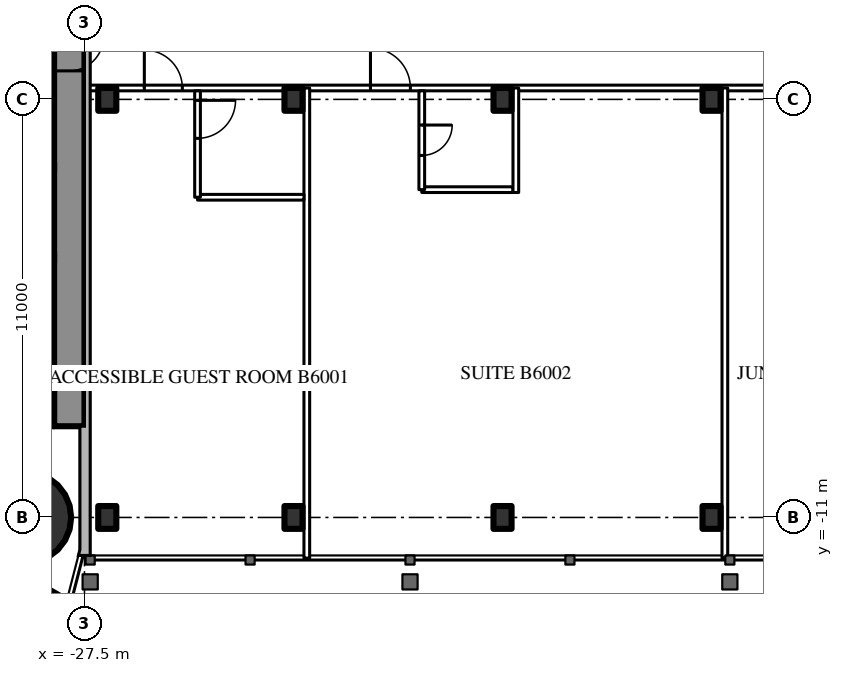
"""IFC4 building model, lengths in metres.
Left out: names, types, materials, properties, quantities, classifications, styles, units other than length and angle.
Written with IfcOpenShell. Run it as: python <this file> out.ifc"""

import sys

from ifc_helpers import new_model, si_unit, direction, frame, frame_2d, origin, origin_2d, place, context, subcontext, project, spatial, rectangle, circle, i_section, extrude, element, fill, save


model = new_model("IFC4")
c1 = context("Model", 3, precision=1e-05, world=origin(), true_north=direction((0.0, 1.0)))
c2 = subcontext(c1, "Body", "Model", "MODEL_VIEW")
j1 = project(units=[si_unit("LENGTHUNIT", "METRE"), si_unit("PLANEANGLEUNIT", "RADIAN")], contexts=[c1])
p1 = place(None, origin())
s1 = spatial("IfcSite", under=j1, at=p1, CompositionType="ELEMENT")
p2 = place(p1, origin())
s2 = spatial("IfcBuilding", under=s1, at=p2, CompositionType="ELEMENT")
p3 = place(p2, frame((0.0, 0.0, 226.1)))
s3 = spatial("IfcBuildingStorey", under=s2, at=p3, CompositionType="ELEMENT", Elevation=226.1)
p4 = place(p3, frame((-29.05, -11.0, 0.0), z_axis=(0.0, 0.0, 1.0), x_axis=(1.0, 0.0, 0.0)))
e1 = element("IfcColumn", 1, at=p4, inside=s3, PredefinedType="COLUMN", context=c2, shape_type="SweptSolid", body=[
    extrude(circle(Radius=1.2, at=origin_2d()), origin(), (0.0, 0.0, 1.0), 3.6),
])
p5 = place(p3, frame((-27.9, 8.6, 0.0), z_axis=(0.0, 0.0, 1.0), x_axis=(0.0, -1.0, 0.0)))
e2 = element("IfcWall", 2, at=p5, inside=s3, PredefinedType="SHEAR", context=c2, shape_type="SweptSolid", body=[
    extrude(rectangle(XDim=17.2, YDim=0.8, at=frame_2d((8.6, 0.0))), origin(), (0.0, 0.0, 1.0), 3.6),
])
p6 = place(p5, frame((6.95, 0.0, 0.0)))
e3 = element("IfcOpeningElement", 3, at=p6, cuts=e2, PredefinedType="OPENING", context=c2, shape_type="SweptSolid", body=[
    extrude(rectangle(XDim=0.9, YDim=2.2, at=frame_2d((0.45, 1.1))), frame((0.0, 0.41, 0.0), z_axis=(0.0, -1.0, 0.0), x_axis=(1.0, 0.0, 0.0)), (0.0, 0.0, 1.0), 0.82),
])
p7 = place(p3, frame((-28.3, -8.0, 0.0), z_axis=(0.0, 0.0, 1.0), x_axis=(-1.0, 0.0, 0.0)))
e4 = element("IfcWall", 4, at=p7, inside=s3, PredefinedType="SHEAR", context=c2, shape_type="SweptSolid", body=[
    extrude(rectangle(XDim=8.4, YDim=1.2, at=frame_2d((4.2, 0.0))), origin(), (0.0, 0.0, 1.0), 3.6),
])
p8 = place(p7, frame((0.25, 0.0, 0.0)))
e5 = element("IfcOpeningElement", 5, at=p8, cuts=e4, PredefinedType="OPENING", context=c2, shape_type="SweptSolid", body=[
    extrude(rectangle(XDim=1.0, YDim=2.2, at=frame_2d((0.5, 1.1))), frame((0.0, 0.61, 0.0), z_axis=(0.0, -1.0, 0.0), x_axis=(1.0, 0.0, 0.0)), (0.0, 0.0, 1.0), 1.22),
])
p9 = place(p3, frame((-28.3, -4.15, 0.0), z_axis=(0.0, 0.0, 1.0), x_axis=(-1.0, 0.0, 0.0)))
e6 = element("IfcWall", 6, at=p9, inside=s3, PredefinedType="SHEAR", context=c2, shape_type="SweptSolid", body=[
    extrude(rectangle(XDim=8.4, YDim=0.3, at=frame_2d((4.2, 0.0))), origin(), (0.0, 0.0, 1.0), 3.6),
])
p10 = place(p3, frame((-28.3, -1.775, 0.0), z_axis=(0.0, 0.0, 1.0), x_axis=(-1.0, 0.0, 0.0)))
e7 = element("IfcWall", 7, at=p10, inside=s3, PredefinedType="SHEAR", context=c2, shape_type="SweptSolid", body=[
    extrude(rectangle(XDim=2.9, YDim=0.25, at=frame_2d((1.45, 0.0))), origin(), (0.0, 0.0, 1.0), 3.6),
])
p11 = place(p3, frame((-27.2, 14.3, 0.0), z_axis=(0.0, 0.0, 1.0), x_axis=(-0.866026593062, -0.499997940104, 0.0)))
e8 = element("IfcWall", 8, at=p11, inside=s3, PredefinedType="SHEAR", context=c2, shape_type="SweptSolid", body=[
    extrude(rectangle(XDim=28.946, YDim=1.2, at=frame_2d((14.473, 0.0))), origin(), (0.0, 0.0, 1.0), 3.6),
])
p12 = place(p11, frame((4.6, 0.0, 0.0)))
e9 = element("IfcOpeningElement", 9, at=p12, cuts=e8, PredefinedType="OPENING", context=c2, shape_type="SweptSolid", body=[
    extrude(rectangle(XDim=1.0, YDim=2.2, at=frame_2d((0.5, 1.1))), frame((0.0, 0.61, 0.0), z_axis=(0.0, -1.0, 0.0), x_axis=(1.0, 0.0, 0.0)), (0.0, 0.0, 1.0), 1.22),
])
p13 = place(p11, frame((13.395, 0.0, 0.0)))
e10 = element("IfcOpeningElement", 10, at=p13, cuts=e8, PredefinedType="OPENING", context=c2, shape_type="SweptSolid", body=[
    extrude(rectangle(XDim=1.8, YDim=2.2, at=frame_2d((0.9, 1.1))), frame((0.0, 0.61, 0.0), z_axis=(0.0, -1.0, 0.0), x_axis=(1.0, 0.0, 0.0)), (0.0, 0.0, 1.0), 1.22),
])
p14 = place(p3, frame((-27.2, -14.3, 0.0), z_axis=(0.0, 0.0, 1.0), x_axis=(-0.866024021859, 0.500002393557, 0.0)))
e11 = element("IfcWall", 11, at=p14, inside=s3, PredefinedType="SHEAR", context=c2, shape_type="SweptSolid", body=[
    extrude(rectangle(XDim=27.907, YDim=1.2, at=frame_2d((13.954, 0.0))), origin(), (0.0, 0.0, 1.0), 3.6),
])
p15 = place(p14, frame((4.6, 0.0, 0.0)))
e12 = element("IfcOpeningElement", 12, at=p15, cuts=e11, PredefinedType="OPENING", context=c2, shape_type="SweptSolid", body=[
    extrude(rectangle(XDim=1.0, YDim=2.2, at=frame_2d((0.5, 1.1))), frame((0.0, 0.61, 0.0), z_axis=(0.0, -1.0, 0.0), x_axis=(1.0, 0.0, 0.0)), (0.0, 0.0, 1.0), 1.22),
])
p16 = place(p14, frame((13.395, 0.0, 0.0)))
e13 = element("IfcOpeningElement", 13, at=p16, cuts=e11, PredefinedType="OPENING", context=c2, shape_type="SweptSolid", body=[
    extrude(rectangle(XDim=1.8, YDim=2.2, at=frame_2d((0.9, 1.1))), frame((0.0, 0.61, 0.0), z_axis=(0.0, -1.0, 0.0), x_axis=(1.0, 0.0, 0.0)), (0.0, 0.0, 1.0), 1.22),
])
for number, where, z_axis, x_axis in (
    (14, (-26.9, -11.0, 0.0), (0.0, 0.0, 1.0), (1.0, 0.0, 0.0)),
    (15, (-22.0, -11.0, 0.0), (0.0, 0.0, 1.0), (1.0, 0.0, 0.0)),
    (16, (-16.5, -11.0, 0.0), (0.0, 0.0, 1.0), (1.0, 0.0, 0.0)),
    (17, (-11.0, -11.0, 0.0), (0.0, 0.0, 1.0), (1.0, 0.0, 0.0)),
    (18, (-26.9, 0.0, 0.0), (0.0, 0.0, 1.0), (1.0, 0.0, 0.0)),
    (19, (-22.0, 0.0, 0.0), (0.0, 0.0, 1.0), (1.0, 0.0, 0.0)),
    (20, (-16.5, 0.0, 0.0), (0.0, 0.0, 1.0), (1.0, 0.0, 0.0)),
    (21, (-11.0, 0.0, 0.0), (0.0, 0.0, 1.0), (1.0, 0.0, 0.0)),
):
    element("IfcColumn", number, at=place(p3, frame(where, z_axis=z_axis, x_axis=x_axis)), inside=s3, PredefinedType="COLUMN", context=c2, shape_type="SweptSolid", body=[
        extrude(i_section(OverallWidth=0.476, OverallDepth=0.6, WebThickness=0.1, FlangeThickness=0.14, FilletRadius=0.02, at=origin_2d()), origin(), (0.0, 0.0, 1.0), 3.6),
    ])
p17 = place(p3, frame((-27.5, 0.3, 0.0), z_axis=(0.0, 0.0, 1.0), x_axis=(1.0, 0.0, 0.0)))
e22 = element("IfcWall", 22, at=p17, inside=s3, PredefinedType="PARTITIONING", context=c2, shape_type="SweptSolid", body=[
    extrude(rectangle(XDim=55.0, YDim=0.15, at=frame_2d((27.5, 0.0))), origin(), (0.0, 0.0, 1.0), 2.4),
])
p18 = place(p17, frame((1.575, 0.0, 0.0)))
e23 = element("IfcOpeningElement", 23, at=p18, cuts=e22, PredefinedType="OPENING", context=c2, shape_type="SweptSolid", body=[
    extrude(rectangle(XDim=1.0, YDim=2.2, at=frame_2d((0.5, 1.1))), frame((0.0, 0.085, 0.0), z_axis=(0.0, -1.0, 0.0), x_axis=(1.0, 0.0, 0.0)), (0.0, 0.0, 1.0), 0.17),
])
p19 = place(p17, frame((7.525, 0.0, 0.0)))
e24 = element("IfcOpeningElement", 24, at=p19, cuts=e22, PredefinedType="OPENING", context=c2, shape_type="SweptSolid", body=[
    extrude(rectangle(XDim=1.05, YDim=2.4, at=frame_2d((0.525, 1.2))), frame((0.0, 0.085, 0.0), z_axis=(0.0, -1.0, 0.0), x_axis=(1.0, 0.0, 0.0)), (0.0, 0.0, 1.0), 0.17),
])
p20 = place(p17, frame((18.525, 0.0, 0.0)))
e25 = element("IfcOpeningElement", 25, at=p20, cuts=e22, PredefinedType="OPENING", context=c2, shape_type="SweptSolid", body=[
    extrude(rectangle(XDim=1.05, YDim=2.4, at=frame_2d((0.525, 1.2))), frame((0.0, 0.085, 0.0), z_axis=(0.0, -1.0, 0.0), x_axis=(1.0, 0.0, 0.0)), (0.0, 0.0, 1.0), 0.17),
])
p21 = place(p17, frame((24.025, 0.0, 0.0)))
e26 = element("IfcOpeningElement", 26, at=p21, cuts=e22, PredefinedType="OPENING", context=c2, shape_type="SweptSolid", body=[
    extrude(rectangle(XDim=1.05, YDim=2.4, at=frame_2d((0.525, 1.2))), frame((0.0, 0.085, 0.0), z_axis=(0.0, -1.0, 0.0), x_axis=(1.0, 0.0, 0.0)), (0.0, 0.0, 1.0), 0.17),
])
p22 = place(p17, frame((35.025, 0.0, 0.0)))
e27 = element("IfcOpeningElement", 27, at=p22, cuts=e22, PredefinedType="OPENING", context=c2, shape_type="SweptSolid", body=[
    extrude(rectangle(XDim=1.05, YDim=2.4, at=frame_2d((0.525, 1.2))), frame((0.0, 0.085, 0.0), z_axis=(0.0, -1.0, 0.0), x_axis=(1.0, 0.0, 0.0)), (0.0, 0.0, 1.0), 0.17),
])
p23 = place(p17, frame((40.525, 0.0, 0.0)))
e28 = element("IfcOpeningElement", 28, at=p23, cuts=e22, PredefinedType="OPENING", context=c2, shape_type="SweptSolid", body=[
    extrude(rectangle(XDim=1.05, YDim=2.4, at=frame_2d((0.525, 1.2))), frame((0.0, 0.085, 0.0), z_axis=(0.0, -1.0, 0.0), x_axis=(1.0, 0.0, 0.0)), (0.0, 0.0, 1.0), 0.17),
])
p24 = place(p17, frame((52.525, 0.0, 0.0)))
e29 = element("IfcOpeningElement", 29, at=p24, cuts=e22, PredefinedType="OPENING", context=c2, shape_type="SweptSolid", body=[
    extrude(rectangle(XDim=1.05, YDim=2.4, at=frame_2d((0.525, 1.2))), frame((0.0, 0.085, 0.0), z_axis=(0.0, -1.0, 0.0), x_axis=(1.0, 0.0, 0.0)), (0.0, 0.0, 1.0), 0.17),
])
for number, where, z_axis, x_axis in (
    (30, (-21.65, -12.07, 0.0), (0.0, 0.0, 1.0), (0.0, 1.0, 0.0)),
    (31, (-10.65, -12.07, 0.0), (0.0, 0.0, 1.0), (0.0, 1.0, 0.0)),
):
    element("IfcWall", number, at=place(p3, frame(where, z_axis=z_axis, x_axis=x_axis)), inside=s3, PredefinedType="PARTITIONING", context=c2, shape_type="SweptSolid", body=[
        extrude(rectangle(XDim=12.37, YDim=0.15, at=frame_2d((6.185, 0.0))), origin(), (0.0, 0.0, 1.0), 3.4),
    ])
p25 = place(p3, frame((-24.525, -2.575, 0.0), z_axis=(0.0, 0.0, 1.0), x_axis=(1.0, 0.0, 0.0)))
e32 = element("IfcWall", 32, at=p25, inside=s3, PredefinedType="PARTITIONING", context=c2, shape_type="SweptSolid", body=[
    extrude(rectangle(XDim=2.8, YDim=0.15, at=frame_2d((1.4, 0.0))), origin(), (0.0, 0.0, 1.0), 3.4),
])
p26 = place(p3, frame((-24.525, -2.575, 0.0), z_axis=(0.0, 0.0, 1.0), x_axis=(0.0, 1.0, 0.0)))
e33 = element("IfcWall", 33, at=p26, inside=s3, PredefinedType="PARTITIONING", context=c2, shape_type="SweptSolid", body=[
    extrude(rectangle(XDim=2.8, YDim=0.15, at=frame_2d((1.4, 0.0))), origin(), (0.0, 0.0, 1.0), 3.4),
])
p27 = place(p26, frame((1.55, 0.0, 0.0)))
e34 = element("IfcOpeningElement", 34, at=p27, cuts=e33, PredefinedType="OPENING", context=c2, shape_type="SweptSolid", body=[
    extrude(rectangle(XDim=1.0, YDim=2.2, at=frame_2d((0.5, 1.1))), frame((0.0, 0.085, 0.0), z_axis=(0.0, -1.0, 0.0), x_axis=(1.0, 0.0, 0.0)), (0.0, 0.0, 1.0), 0.17),
])
p28 = place(p3, frame((-18.625, -2.375, 0.0), z_axis=(0.0, 0.0, 1.0), x_axis=(1.0, 0.0, 0.0)))
e35 = element("IfcWall", 35, at=p28, inside=s3, PredefinedType="PARTITIONING", context=c2, shape_type="SweptSolid", body=[
    extrude(rectangle(XDim=2.4, YDim=0.15, at=frame_2d((1.2, 0.0))), origin(), (0.0, 0.0, 1.0), 3.4),
])
p29 = place(p3, frame((-18.625, -2.375, 0.0), z_axis=(0.0, 0.0, 1.0), x_axis=(0.0, 1.0, 0.0)))
e36 = element("IfcWall", 36, at=p29, inside=s3, PredefinedType="PARTITIONING", context=c2, shape_type="SweptSolid", body=[
    extrude(rectangle(XDim=2.6, YDim=0.15, at=frame_2d((1.3, 0.0))), origin(), (0.0, 0.0, 1.0), 3.4),
])
p30 = place(p29, frame((0.9, 0.0, 0.0)))
e37 = element("IfcOpeningElement", 37, at=p30, cuts=e36, PredefinedType="OPENING", context=c2, shape_type="SweptSolid", body=[
    extrude(rectangle(XDim=0.8, YDim=2.2, at=frame_2d((0.4, 1.1))), frame((0.0, 0.085, 0.0), z_axis=(0.0, -1.0, 0.0), x_axis=(1.0, 0.0, 0.0)), (0.0, 0.0, 1.0), 0.17),
])
p31 = place(p3, frame((-16.15, -2.45, 0.0), z_axis=(0.0, 0.0, 1.0), x_axis=(0.0, 1.0, 0.0)))
e38 = element("IfcWall", 38, at=p31, inside=s3, PredefinedType="PARTITIONING", context=c2, shape_type="SweptSolid", body=[
    extrude(rectangle(XDim=2.75, YDim=0.15, at=frame_2d((1.375, 0.0))), origin(), (0.0, 0.0, 1.0), 3.4),
])
p32 = place(p6, origin())
e39 = element("IfcDoor", 39, at=p32, inside=s3, OperationType="SINGLE_SWING_LEFT", PredefinedType="DOOR", context=c2, shape_type="SweptSolid", body=[
    extrude(rectangle(XDim=0.9, YDim=2.2, at=frame_2d((0.45, 1.1))), frame((0.0, 0.025, 0.0), z_axis=(0.0, -1.0, 0.0), x_axis=(1.0, 0.0, 0.0)), (0.0, 0.0, 1.0), 0.05),
])
fill(e3, e39)
p33 = place(p27, origin())
e40 = element("IfcDoor", 40, at=p33, inside=s3, OperationType="SINGLE_SWING_RIGHT", PredefinedType="DOOR", context=c2, shape_type="SweptSolid", body=[
    extrude(rectangle(XDim=1.0, YDim=2.2, at=frame_2d((0.5, 1.1))), frame((0.0, 0.025, 0.0), z_axis=(0.0, -1.0, 0.0), x_axis=(1.0, 0.0, 0.0)), (0.0, 0.0, 1.0), 0.05),
])
fill(e34, e40)
p34 = place(p18, origin())
e41 = element("IfcDoor", 41, at=p34, inside=s3, OperationType="SINGLE_SWING_LEFT", PredefinedType="DOOR", context=c2, shape_type="SweptSolid", body=[
    extrude(rectangle(XDim=1.0, YDim=2.2, at=frame_2d((0.5, 1.1))), frame((0.0, 0.025, 0.0), z_axis=(0.0, -1.0, 0.0), x_axis=(1.0, 0.0, 0.0)), (0.0, 0.0, 1.0), 0.05),
])
fill(e23, e41)
p35 = place(p30, origin())
e42 = element("IfcDoor", 42, at=p35, inside=s3, OperationType="SINGLE_SWING_RIGHT", PredefinedType="DOOR", context=c2, shape_type="SweptSolid", body=[
    extrude(rectangle(XDim=0.8, YDim=2.2, at=frame_2d((0.4, 1.1))), frame((0.0, 0.025, 0.0), z_axis=(0.0, -1.0, 0.0), x_axis=(1.0, 0.0, 0.0)), (0.0, 0.0, 1.0), 0.05),
])
fill(e37, e42)
p36 = place(p19, origin())
e43 = element("IfcDoor", 43, at=p36, inside=s3, OperationType="SINGLE_SWING_LEFT", PredefinedType="DOOR", context=c2, shape_type="SweptSolid", body=[
    extrude(rectangle(XDim=1.05, YDim=2.4, at=frame_2d((0.525, 1.2))), frame((0.0, 0.025, 0.0), z_axis=(0.0, -1.0, 0.0), x_axis=(1.0, 0.0, 0.0)), (0.0, 0.0, 1.0), 0.05),
])
fill(e24, e43)
save(model, sys.argv[1])
